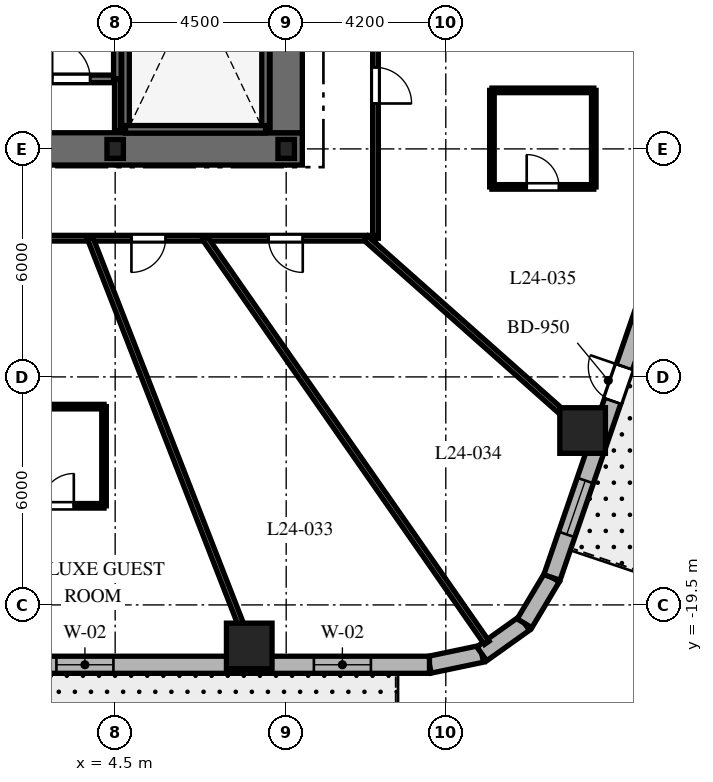
"""IFC4 building model, lengths in metres.
Left out: names, types, materials, properties, quantities, classifications, styles, units other than length and angle.
Written with IfcOpenShell. Run it as: python <this file> out.ifc"""

import sys

from ifc_helpers import new_model, si_unit, direction, frame, frame_2d, origin, origin_2d, place, context, subcontext, project, spatial, rectangle, i_section, extrude, element, fill, save


model = new_model("IFC4")
c1 = context("Model", 3, precision=1e-05, world=origin(), true_north=direction((0.0, 1.0)))
c2 = subcontext(c1, "Body", "Model", "MODEL_VIEW")
j1 = project(units=[si_unit("LENGTHUNIT", "METRE"), si_unit("PLANEANGLEUNIT", "RADIAN")], contexts=[c1])
p1 = place(None, origin())
s1 = spatial("IfcSite", under=j1, at=p1, CompositionType="ELEMENT")
p2 = place(p1, origin())
s2 = spatial("IfcBuilding", under=s1, at=p2, CompositionType="ELEMENT")
p3 = place(p2, frame((0.0, 0.0, 102.5)))
s3 = spatial("IfcBuildingStorey", under=s2, at=p3, CompositionType="ELEMENT", Elevation=102.5)
p4 = place(p3, frame((-9.425, -7.5, 0.0), z_axis=(0.0, 0.0, 1.0), x_axis=(1.0, 0.0, 0.0)))
e1 = element("IfcWall", 1, at=p4, inside=s3, PredefinedType="SHEAR", context=c2, shape_type="SweptSolid", body=[
    extrude(rectangle(XDim=18.85, YDim=0.85, at=frame_2d((9.425, 0.0))), origin(), (0.0, 0.0, 1.0), 3.7),
])
p5 = place(p4, frame((9.475, 0.0, 0.0)))
e2 = element("IfcOpeningElement", 2, at=p5, cuts=e1, PredefinedType="OPENING", context=c2, shape_type="SweptSolid", body=[
    extrude(rectangle(XDim=1.0, YDim=2.15, at=frame_2d((0.5, 1.075))), frame((0.0, 0.435, 0.0), z_axis=(0.0, -1.0, 0.0), x_axis=(1.0, 0.0, 0.0)), (0.0, 0.0, 1.0), 0.87),
])
p6 = place(p3, frame((9.0, -7.075, 0.0), z_axis=(0.0, 0.0, 1.0), x_axis=(0.0, 1.0, 0.0)))
e3 = element("IfcWall", 3, at=p6, inside=s3, PredefinedType="SHEAR", context=c2, shape_type="SweptSolid", body=[
    extrude(rectangle(XDim=14.15, YDim=0.85, at=frame_2d((7.075, 0.0))), origin(), (0.0, 0.0, 1.0), 3.7),
])
p7 = place(p6, frame((10.2, 0.0, 0.0)))
e4 = element("IfcOpeningElement", 4, at=p7, cuts=e3, PredefinedType="OPENING", context=c2, shape_type="SweptSolid", body=[
    extrude(rectangle(XDim=1.05, YDim=2.15, at=frame_2d((0.525, 1.075))), frame((0.0, 0.435, 0.0), z_axis=(0.0, -1.0, 0.0), x_axis=(1.0, 0.0, 0.0)), (0.0, 0.0, 1.0), 0.87),
])
for number, where, z_axis, x_axis in (
    (5, (4.772, -6.985, 0.0), (0.0, 0.0, 1.0), (0.0, 1.0, 0.0)),
    (6, (8.458, -6.985, 0.0), (0.0, 0.0, 1.0), (0.0, 1.0, 0.0)),
):
    element("IfcWall", number, at=place(p3, frame(where, z_axis=z_axis, x_axis=x_axis)), inside=s3, PredefinedType="SHEAR", context=c2, shape_type="SweptSolid", body=[
        extrude(rectangle(XDim=9.143, YDim=0.2, at=frame_2d((4.572, 0.0))), origin(), (0.0, 0.0, 1.0), 3.7),
    ])
p8 = place(p3, frame((4.772, -6.985, 0.0), z_axis=(0.0, 0.0, 1.0), x_axis=(1.0, 0.0, 0.0)))
e7 = element("IfcWall", 7, at=p8, inside=s3, PredefinedType="SHEAR", context=c2, shape_type="SweptSolid", body=[
    extrude(rectangle(XDim=3.686, YDim=0.2, at=frame_2d((1.843, 0.0))), origin(), (0.0, 0.0, 1.0), 3.7),
])
p9 = place(p3, frame((-4.608, -5.658, 0.0), z_axis=(0.0, 0.0, 1.0), x_axis=(1.0, 0.0, 0.0)))
e8 = element("IfcWall", 8, at=p9, inside=s3, PredefinedType="SHEAR", context=c2, shape_type="SweptSolid", body=[
    extrude(rectangle(XDim=9.166, YDim=0.2, at=frame_2d((4.583, 0.0))), origin(), (0.0, 0.0, 1.0), 3.7),
])
p10 = place(p9, frame((7.45, 0.0, 0.0)))
e9 = element("IfcOpeningElement", 9, at=p10, cuts=e8, PredefinedType="OPENING", context=c2, shape_type="SweptSolid", body=[
    extrude(rectangle(XDim=1.0, YDim=2.15, at=frame_2d((0.5, 1.075))), frame((0.0, 0.11, 0.0), z_axis=(0.0, -1.0, 0.0), x_axis=(1.0, 0.0, 0.0)), (0.0, 0.0, 1.0), 0.22),
])
p11 = place(p3, frame((4.558, -5.658, 0.0), z_axis=(0.0, 0.0, 1.0), x_axis=(0.0, 1.0, 0.0)))
e10 = element("IfcWall", 10, at=p11, inside=s3, PredefinedType="SHEAR", context=c2, shape_type="SweptSolid", body=[
    extrude(rectangle(XDim=3.686, YDim=0.2, at=frame_2d((1.843, 0.0))), origin(), (0.0, 0.0, 1.0), 3.7),
])
for number, where, z_axis, x_axis in (
    (11, (4.5, -7.5, 0.0), (0.0, 0.0, 1.0), (1.0, 0.0, 0.0)),
    (12, (9.0, -7.5, 0.0), (0.0, 0.0, 1.0), (1.0, 0.0, 0.0)),
):
    element("IfcColumn", number, at=place(p3, frame(where, z_axis=z_axis, x_axis=x_axis)), inside=s3, PredefinedType="COLUMN", context=c2, shape_type="SweptSolid", body=[
        extrude(i_section(OverallWidth=0.432, OverallDepth=0.498, WebThickness=0.056, FlangeThickness=0.089, at=origin_2d()), origin(), (0.0, 0.0, 1.0), 3.7),
    ])
for number, where, z_axis, x_axis in (
    (13, (8.028, -20.58, 0.0), (0.0, 0.0, 1.0), (1.0, 0.0, 0.0)),
    (14, (16.8, -14.911, 0.0), (0.0, 0.0, 1.0), (1.0, 0.0, 0.0)),
):
    element("IfcColumn", number, at=place(p3, frame(where, z_axis=z_axis, x_axis=x_axis)), inside=s3, PredefinedType="COLUMN", context=c2, shape_type="SweptSolid", body=[
        extrude(rectangle(XDim=1.2, YDim=1.2, at=origin_2d()), origin(), (0.0, 0.0, 1.0), 3.7),
    ])
p12 = place(p3, frame((12.771, -21.075, 0.0), z_axis=(0.0, 0.0, 1.0), x_axis=(0.97874281988, 0.205091424819, 0.0)))
e15 = element("IfcWall", 15, at=p12, inside=s3, PredefinedType="SOLIDWALL", context=c2, shape_type="SweptSolid", body=[
    extrude(rectangle(XDim=1.406, YDim=0.45, at=frame_2d((0.703, 0.0))), origin(), (0.0, 0.0, 1.0), 3.4),
])
p13 = place(p3, frame((14.146, -20.787, 0.0), z_axis=(0.0, 0.0, 1.0), x_axis=(0.814162929117, 0.580636482536, 0.0)))
e16 = element("IfcWall", 16, at=p13, inside=s3, PredefinedType="SOLIDWALL", context=c2, shape_type="SweptSolid", body=[
    extrude(rectangle(XDim=1.382, YDim=0.45, at=frame_2d((0.691, 0.0))), origin(), (0.0, 0.0, 1.0), 3.4),
])
p14 = place(p3, frame((15.272, -19.984, 0.0), z_axis=(0.0, 0.0, 1.0), x_axis=(0.512579347361, 0.858639862025, 0.0)))
e17 = element("IfcWall", 17, at=p14, inside=s3, PredefinedType="SOLIDWALL", context=c2, shape_type="SweptSolid", body=[
    extrude(rectangle(XDim=1.406, YDim=0.45, at=frame_2d((0.703, 0.0))), origin(), (0.0, 0.0, 1.0), 3.4),
])
p15 = place(p3, frame((-11.012, -21.075, 0.0), z_axis=(0.0, 0.0, 1.0), x_axis=(1.0, 0.0, 0.0)))
e18 = element("IfcWall", 18, at=p15, inside=s3, PredefinedType="SOLIDWALL", context=c2, shape_type="SweptSolid", body=[
    extrude(rectangle(XDim=23.782, YDim=0.45, at=frame_2d((11.891, 0.0))), origin(), (0.0, 0.0, 1.0), 3.4),
])
p16 = place(p15, frame((2.473, 0.0, 0.0)))
e19 = element("IfcOpeningElement", 19, at=p16, cuts=e18, PredefinedType="OPENING", context=c2, shape_type="SweptSolid", body=[
    extrude(rectangle(XDim=1.0, YDim=2.15, at=frame_2d((0.5, 1.075))), frame((0.0, 0.235, 0.0), z_axis=(0.0, -1.0, 0.0), x_axis=(1.0, 0.0, 0.0)), (0.0, 0.0, 1.0), 0.47),
])
p17 = place(p15, frame((7.398, 0.0, 0.8)))
e20 = element("IfcOpeningElement", 20, at=p17, cuts=e18, PredefinedType="OPENING", context=c2, shape_type="SweptSolid", body=[
    extrude(rectangle(XDim=1.5, YDim=1.8, at=frame_2d((0.75, 0.9))), frame((0.0, 0.235, 0.0), z_axis=(0.0, -1.0, 0.0), x_axis=(1.0, 0.0, 0.0)), (0.0, 0.0, 1.0), 0.47),
])
p18 = place(p15, frame((13.966, 0.0, 0.8)))
e21 = element("IfcOpeningElement", 21, at=p18, cuts=e18, PredefinedType="OPENING", context=c2, shape_type="SweptSolid", body=[
    extrude(rectangle(XDim=1.5, YDim=1.8, at=frame_2d((0.75, 0.9))), frame((0.0, 0.235, 0.0), z_axis=(0.0, -1.0, 0.0), x_axis=(1.0, 0.0, 0.0)), (0.0, 0.0, 1.0), 0.47),
])
p19 = place(p15, frame((20.741, 0.0, 0.8)))
e22 = element("IfcOpeningElement", 22, at=p19, cuts=e18, PredefinedType="OPENING", context=c2, shape_type="SweptSolid", body=[
    extrude(rectangle(XDim=1.5, YDim=1.8, at=frame_2d((0.75, 0.9))), frame((0.0, 0.235, 0.0), z_axis=(0.0, -1.0, 0.0), x_axis=(1.0, 0.0, 0.0)), (0.0, 0.0, 1.0), 0.47),
])
p20 = place(p3, frame((15.992, -18.777, 0.0), z_axis=(0.0, 0.0, 1.0), x_axis=(0.325606988926, 0.945505202927, 0.0)))
e23 = element("IfcWall", 23, at=p20, inside=s3, PredefinedType="SOLIDWALL", context=c2, shape_type="SweptSolid", body=[
    extrude(rectangle(XDim=19.669, YDim=0.45, at=frame_2d((9.835, 0.0))), origin(), (0.0, 0.0, 1.0), 3.4),
])
p21 = place(p20, frame((4.909, 0.0, 0.0)))
e24 = element("IfcOpeningElement", 24, at=p21, cuts=e23, PredefinedType="OPENING", context=c2, shape_type="SweptSolid", body=[
    extrude(rectangle(XDim=0.95, YDim=2.15, at=frame_2d((0.475, 1.075))), frame((0.0, 0.235, 0.0), z_axis=(0.0, -1.0, 0.0), x_axis=(1.0, 0.0, 0.0)), (0.0, 0.0, 1.0), 0.47),
])
p22 = place(p20, frame((1.197, 0.0, 0.8)))
e25 = element("IfcOpeningElement", 25, at=p22, cuts=e23, PredefinedType="OPENING", context=c2, shape_type="SweptSolid", body=[
    extrude(rectangle(XDim=1.5, YDim=1.8, at=frame_2d((0.75, 0.9))), frame((0.0, 0.235, 0.0), z_axis=(0.0, -1.0, 0.0), x_axis=(1.0, 0.0, 0.0)), (0.0, 0.0, 1.0), 0.47),
])
p23 = place(p20, frame((9.03, 0.0, 0.8)))
e26 = element("IfcOpeningElement", 26, at=p23, cuts=e23, PredefinedType="OPENING", context=c2, shape_type="SweptSolid", body=[
    extrude(rectangle(XDim=1.5, YDim=1.8, at=frame_2d((0.75, 0.9))), frame((0.0, 0.235, 0.0), z_axis=(0.0, -1.0, 0.0), x_axis=(1.0, 0.0, 0.0)), (0.0, 0.0, 1.0), 0.47),
])
p24 = place(p20, frame((16.918, 0.0, 0.8)))
e27 = element("IfcOpeningElement", 27, at=p24, cuts=e23, PredefinedType="OPENING", context=c2, shape_type="SweptSolid", body=[
    extrude(rectangle(XDim=1.5, YDim=1.8, at=frame_2d((0.75, 0.9))), frame((0.0, 0.235, 0.0), z_axis=(0.0, -1.0, 0.0), x_axis=(1.0, 0.0, 0.0)), (0.0, 0.0, 1.0), 0.47),
])
p25 = place(p3, frame((4.558, -7.02, 0.0), z_axis=(0.0, 0.0, 1.0), x_axis=(0.0, 1.0, 0.0)))
e28 = element("IfcWall", 28, at=p25, inside=s3, PredefinedType="PARTITIONING", context=c2, shape_type="SweptSolid", body=[
    extrude(rectangle(XDim=1.362, YDim=0.15, at=frame_2d((0.681, 0.0))), origin(), (0.0, 0.0, 1.0), 3.4),
])
p26 = place(p3, frame((11.35, 9.85, 0.0), z_axis=(0.0, 0.0, 1.0), x_axis=(0.0, -1.0, 0.0)))
e29 = element("IfcWall", 29, at=p26, inside=s3, PredefinedType="PARTITIONING", context=c2, shape_type="SweptSolid", body=[
    extrude(rectangle(XDim=19.7, YDim=0.15, at=frame_2d((9.85, 0.0))), origin(), (0.0, 0.0, 1.0), 2.84),
])
p27 = place(p26, frame((4.448, 0.0, 0.0)))
e30 = element("IfcOpeningElement", 30, at=p27, cuts=e29, PredefinedType="OPENING", context=c2, shape_type="SweptSolid", body=[
    extrude(rectangle(XDim=0.95, YDim=2.03, at=frame_2d((0.475, 1.015))), frame((0.0, 0.085, 0.0), z_axis=(0.0, -1.0, 0.0), x_axis=(1.0, 0.0, 0.0)), (0.0, 0.0, 1.0), 0.17),
])
p28 = place(p26, frame((1.249, 0.0, 0.0)))
e31 = element("IfcOpeningElement", 31, at=p28, cuts=e29, PredefinedType="OPENING", context=c2, shape_type="SweptSolid", body=[
    extrude(rectangle(XDim=0.9, YDim=2.03, at=frame_2d((0.45, 1.015))), frame((0.0, 0.085, 0.0), z_axis=(0.0, -1.0, 0.0), x_axis=(1.0, 0.0, 0.0)), (0.0, 0.0, 1.0), 0.17),
])
p29 = place(p26, frame((15.205, 0.0, 0.0)))
e32 = element("IfcOpeningElement", 32, at=p29, cuts=e29, PredefinedType="OPENING", context=c2, shape_type="SweptSolid", body=[
    extrude(rectangle(XDim=0.95, YDim=2.03, at=frame_2d((0.475, 1.015))), frame((0.0, 0.085, 0.0), z_axis=(0.0, -1.0, 0.0), x_axis=(1.0, 0.0, 0.0)), (0.0, 0.0, 1.0), 0.17),
])
p30 = place(p26, frame((8.836, 0.0, 0.0)))
e33 = element("IfcOpeningElement", 33, at=p30, cuts=e29, PredefinedType="OPENING", context=c2, shape_type="SweptSolid", body=[
    extrude(rectangle(XDim=0.95, YDim=2.03, at=frame_2d((0.475, 1.015))), frame((0.0, 0.085, 0.0), z_axis=(0.0, -1.0, 0.0), x_axis=(1.0, 0.0, 0.0)), (0.0, 0.0, 1.0), 0.17),
])
p31 = place(p3, frame((11.35, -9.85, 0.0), z_axis=(0.0, 0.0, 1.0), x_axis=(-1.0, 0.0, 0.0)))
e34 = element("IfcWall", 34, at=p31, inside=s3, PredefinedType="PARTITIONING", context=c2, shape_type="SweptSolid", body=[
    extrude(rectangle(XDim=22.7, YDim=0.15, at=frame_2d((11.35, 0.0))), origin(), (0.0, 0.0, 1.0), 2.84),
])
p32 = place(p31, frame((17.237, 0.0, 0.0)))
e35 = element("IfcOpeningElement", 35, at=p32, cuts=e34, PredefinedType="OPENING", context=c2, shape_type="SweptSolid", body=[
    extrude(rectangle(XDim=0.95, YDim=2.03, at=frame_2d((0.475, 1.015))), frame((0.0, 0.085, 0.0), z_axis=(0.0, -1.0, 0.0), x_axis=(1.0, 0.0, 0.0)), (0.0, 0.0, 1.0), 0.17),
])
p33 = place(p31, frame((12.39, 0.0, 0.0)))
e36 = element("IfcOpeningElement", 36, at=p33, cuts=e34, PredefinedType="OPENING", context=c2, shape_type="SweptSolid", body=[
    extrude(rectangle(XDim=0.95, YDim=2.03, at=frame_2d((0.475, 1.015))), frame((0.0, 0.085, 0.0), z_axis=(0.0, -1.0, 0.0), x_axis=(1.0, 0.0, 0.0)), (0.0, 0.0, 1.0), 0.17),
])
p34 = place(p31, frame((8.954, 0.0, 0.0)))
e37 = element("IfcOpeningElement", 37, at=p34, cuts=e34, PredefinedType="OPENING", context=c2, shape_type="SweptSolid", body=[
    extrude(rectangle(XDim=0.95, YDim=2.03, at=frame_2d((0.475, 1.015))), frame((0.0, 0.085, 0.0), z_axis=(0.0, -1.0, 0.0), x_axis=(1.0, 0.0, 0.0)), (0.0, 0.0, 1.0), 0.17),
])
p35 = place(p31, frame((5.522, 0.0, 0.0)))
e38 = element("IfcOpeningElement", 38, at=p35, cuts=e34, PredefinedType="OPENING", context=c2, shape_type="SweptSolid", body=[
    extrude(rectangle(XDim=0.9, YDim=2.03, at=frame_2d((0.45, 1.015))), frame((0.0, 0.085, 0.0), z_axis=(0.0, -1.0, 0.0), x_axis=(1.0, 0.0, 0.0)), (0.0, 0.0, 1.0), 0.17),
])
p36 = place(p31, frame((1.914, 0.0, 0.0)))
e39 = element("IfcOpeningElement", 39, at=p36, cuts=e34, PredefinedType="OPENING", context=c2, shape_type="SweptSolid", body=[
    extrude(rectangle(XDim=0.9, YDim=2.03, at=frame_2d((0.45, 1.015))), frame((0.0, 0.085, 0.0), z_axis=(0.0, -1.0, 0.0), x_axis=(1.0, 0.0, 0.0)), (0.0, 0.0, 1.0), 0.17),
])
p37 = place(p3, frame((3.842, -9.85, 0.0), z_axis=(0.0, 0.0, 1.0), x_axis=(0.363432685593, -0.931620460833, 0.0)))
e40 = element("IfcWall", 40, at=p37, inside=s3, PredefinedType="PARTITIONING", context=c2, shape_type="SweptSolid", body=[
    extrude(rectangle(XDim=12.049, YDim=0.15, at=frame_2d((6.024, 0.0))), origin(), (0.0, 0.0, 1.0), 2.54),
])
p38 = place(p3, frame((6.861, -9.85, 0.0), z_axis=(0.0, 0.0, 1.0), x_axis=(0.571575431292, -0.820549527051, 0.0)))
e41 = element("IfcWall", 41, at=p38, inside=s3, PredefinedType="PARTITIONING", context=c2, shape_type="SweptSolid", body=[
    extrude(rectangle(XDim=12.975, YDim=0.15, at=frame_2d((6.488, 0.0))), origin(), (0.0, 0.0, 1.0), 2.54),
])
p39 = place(p3, frame((11.098, -9.85, 0.0), z_axis=(0.0, 0.0, 1.0), x_axis=(0.747904295103, -0.663806572253, 0.0)))
e42 = element("IfcWall", 42, at=p39, inside=s3, PredefinedType="PARTITIONING", context=c2, shape_type="SweptSolid", body=[
    extrude(rectangle(XDim=8.16, YDim=0.15, at=frame_2d((4.08, 0.0))), origin(), (0.0, 0.0, 1.0), 2.54),
])
p40 = place(p3, frame((1.767, -16.892, 0.0), z_axis=(0.0, 0.0, 1.0), x_axis=(1.0, 0.0, 0.0)))
e43 = element("IfcWall", 43, at=p40, inside=s3, PredefinedType="PARTITIONING", context=c2, shape_type="SweptSolid", body=[
    extrude(rectangle(XDim=2.44, YDim=0.12, at=frame_2d((1.22, 0.0))), origin(), (0.0, 0.0, 1.0), 3.4),
])
p41 = place(p40, frame((0.795, 0.0, 0.0)))
e44 = element("IfcOpeningElement", 44, at=p41, cuts=e43, PredefinedType="OPENING", context=c2, shape_type="SweptSolid", body=[
    extrude(rectangle(XDim=0.85, YDim=2.03, at=frame_2d((0.425, 1.015))), frame((0.0, 0.07, 0.0), z_axis=(0.0, -1.0, 0.0), x_axis=(1.0, 0.0, 0.0)), (0.0, 0.0, 1.0), 0.14),
])
p42 = place(p3, frame((4.207, -16.892, 0.0), z_axis=(0.0, 0.0, 1.0), x_axis=(0.0, 1.0, 0.0)))
e45 = element("IfcWall", 45, at=p42, inside=s3, PredefinedType="PARTITIONING", context=c2, shape_type="SweptSolid", body=[
    extrude(rectangle(XDim=2.61, YDim=0.12, at=frame_2d((1.305, 0.0))), origin(), (0.0, 0.0, 1.0), 2.84),
])
p43 = place(p3, frame((4.207, -14.282, 0.0), z_axis=(0.0, 0.0, 1.0), x_axis=(-1.0, 0.0, 0.0)))
e46 = element("IfcWall", 46, at=p43, inside=s3, PredefinedType="PARTITIONING", context=c2, shape_type="SweptSolid", body=[
    extrude(rectangle(XDim=2.44, YDim=0.12, at=frame_2d((1.22, 0.0))), origin(), (0.0, 0.0, 1.0), 3.4),
])
p44 = place(p3, frame((14.414, -8.5, 0.0), z_axis=(0.0, 0.0, 1.0), x_axis=(1.0, 0.0, 0.0)))
e47 = element("IfcWall", 47, at=p44, inside=s3, PredefinedType="PARTITIONING", context=c2, shape_type="SweptSolid", body=[
    extrude(rectangle(XDim=2.68, YDim=0.12, at=frame_2d((1.34, 0.0))), origin(), (0.0, 0.0, 1.0), 2.972),
])
p45 = place(p44, frame((0.915, 0.0, 0.0)))
e48 = element("IfcOpeningElement", 48, at=p45, cuts=e47, PredefinedType="OPENING", context=c2, shape_type="SweptSolid", body=[
    extrude(rectangle(XDim=0.85, YDim=2.03, at=frame_2d((0.425, 1.015))), frame((0.0, 0.07, 0.0), z_axis=(0.0, -1.0, 0.0), x_axis=(1.0, 0.0, 0.0)), (0.0, 0.0, 1.0), 0.14),
])
p46 = place(p3, frame((17.094, -8.5, 0.0), z_axis=(0.0, 0.0, 1.0), x_axis=(0.0, 1.0, 0.0)))
e49 = element("IfcWall", 49, at=p46, inside=s3, PredefinedType="PARTITIONING", context=c2, shape_type="SweptSolid", body=[
    extrude(rectangle(XDim=2.54, YDim=0.12, at=frame_2d((1.27, 0.0))), origin(), (0.0, 0.0, 1.0), 3.4),
])
p47 = place(p3, frame((17.094, -5.96, 0.0), z_axis=(0.0, 0.0, 1.0), x_axis=(-1.0, 0.0, 0.0)))
e50 = element("IfcWall", 50, at=p47, inside=s3, PredefinedType="PARTITIONING", context=c2, shape_type="SweptSolid", body=[
    extrude(rectangle(XDim=2.68, YDim=0.12, at=frame_2d((1.34, 0.0))), origin(), (0.0, 0.0, 1.0), 2.972),
])
p48 = place(p3, frame((14.414, -5.96, 0.0), z_axis=(0.0, 0.0, 1.0), x_axis=(0.0, -1.0, 0.0)))
e51 = element("IfcWall", 51, at=p48, inside=s3, PredefinedType="PARTITIONING", context=c2, shape_type="SweptSolid", body=[
    extrude(rectangle(XDim=2.54, YDim=0.12, at=frame_2d((1.27, 0.0))), origin(), (0.0, 0.0, 1.0), 3.4),
])
p49 = place(p18, origin())
e52 = element("IfcWindow", 52, at=p49, inside=s3, PartitioningType="SINGLE_PANEL", PredefinedType="WINDOW", context=c2, shape_type="SweptSolid", body=[
    extrude(rectangle(XDim=1.5, YDim=1.8, at=frame_2d((0.75, 0.9))), frame((0.0, 0.03, 0.0), z_axis=(0.0, -1.0, 0.0), x_axis=(1.0, 0.0, 0.0)), (0.0, 0.0, 1.0), 0.06),
])
fill(e21, e52)
p50 = place(p19, origin())
e53 = element("IfcWindow", 53, at=p50, inside=s3, PartitioningType="SINGLE_PANEL", PredefinedType="WINDOW", context=c2, shape_type="SweptSolid", body=[
    extrude(rectangle(XDim=1.5, YDim=1.8, at=frame_2d((0.75, 0.9))), frame((0.0, 0.03, 0.0), z_axis=(0.0, -1.0, 0.0), x_axis=(1.0, 0.0, 0.0)), (0.0, 0.0, 1.0), 0.06),
])
fill(e22, e53)
p51 = place(p21, origin())
e54 = element("IfcDoor", 54, at=p51, inside=s3, OperationType="SINGLE_SWING_RIGHT", PredefinedType="DOOR", context=c2, shape_type="SweptSolid", body=[
    extrude(rectangle(XDim=0.95, YDim=2.15, at=frame_2d((0.475, 1.075))), frame((0.0, 0.025, 0.0), z_axis=(0.0, -1.0, 0.0), x_axis=(1.0, 0.0, 0.0)), (0.0, 0.0, 1.0), 0.05),
])
fill(e24, e54)
p52 = place(p22, origin())
e55 = element("IfcWindow", 55, at=p52, inside=s3, PartitioningType="SINGLE_PANEL", PredefinedType="WINDOW", context=c2, shape_type="SweptSolid", body=[
    extrude(rectangle(XDim=1.5, YDim=1.8, at=frame_2d((0.75, 0.9))), frame((0.0, 0.03, 0.0), z_axis=(0.0, -1.0, 0.0), x_axis=(1.0, 0.0, 0.0)), (0.0, 0.0, 1.0), 0.06),
])
fill(e25, e55)
p53 = place(p10, origin())
e56 = element("IfcDoor", 56, at=p53, inside=s3, OperationType="SINGLE_SWING_LEFT", PredefinedType="DOOR", context=c2, shape_type="SweptSolid", body=[
    extrude(rectangle(XDim=1.0, YDim=2.15, at=frame_2d((0.5, 1.075))), frame((0.0, 0.025, 0.0), z_axis=(0.0, -1.0, 0.0), x_axis=(1.0, 0.0, 0.0)), (0.0, 0.0, 1.0), 0.05),
])
fill(e9, e56)
p54 = place(p41, origin())
e57 = element("IfcDoor", 57, at=p54, inside=s3, OperationType="SINGLE_SWING_RIGHT", PredefinedType="DOOR", context=c2, shape_type="SweptSolid", body=[
    extrude(rectangle(XDim=0.85, YDim=2.03, at=frame_2d((0.425, 1.015))), frame((0.0, 0.025, 0.0), z_axis=(0.0, -1.0, 0.0), x_axis=(1.0, 0.0, 0.0)), (0.0, 0.0, 1.0), 0.05),
])
fill(e44, e57)
p55 = place(p35, origin())
e58 = element("IfcDoor", 58, at=p55, inside=s3, OperationType="SINGLE_SWING_RIGHT", PredefinedType="DOOR", context=c2, shape_type="SweptSolid", body=[
    extrude(rectangle(XDim=0.9, YDim=2.03, at=frame_2d((0.45, 1.015))), frame((0.0, 0.025, 0.0), z_axis=(0.0, -1.0, 0.0), x_axis=(1.0, 0.0, 0.0)), (0.0, 0.0, 1.0), 0.05),
])
fill(e38, e58)
p56 = place(p36, origin())
e59 = element("IfcDoor", 59, at=p56, inside=s3, OperationType="SINGLE_SWING_LEFT", PredefinedType="DOOR", context=c2, shape_type="SweptSolid", body=[
    extrude(rectangle(XDim=0.9, YDim=2.03, at=frame_2d((0.45, 1.015))), frame((0.0, 0.025, 0.0), z_axis=(0.0, -1.0, 0.0), x_axis=(1.0, 0.0, 0.0)), (0.0, 0.0, 1.0), 0.05),
])
fill(e39, e59)
p57 = place(p29, origin())
e60 = element("IfcDoor", 60, at=p57, inside=s3, OperationType="SINGLE_SWING_RIGHT", PredefinedType="DOOR", context=c2, shape_type="SweptSolid", body=[
    extrude(rectangle(XDim=0.95, YDim=2.03, at=frame_2d((0.475, 1.015))), frame((0.0, 0.025, 0.0), z_axis=(0.0, -1.0, 0.0), x_axis=(1.0, 0.0, 0.0)), (0.0, 0.0, 1.0), 0.05),
])
fill(e32, e60)
p58 = place(p45, origin())
e61 = element("IfcDoor", 61, at=p58, inside=s3, OperationType="SINGLE_SWING_LEFT", PredefinedType="DOOR", context=c2, shape_type="SweptSolid", body=[
    extrude(rectangle(XDim=0.85, YDim=2.03, at=frame_2d((0.425, 1.015))), frame((0.0, 0.025, 0.0), z_axis=(0.0, -1.0, 0.0), x_axis=(1.0, 0.0, 0.0)), (0.0, 0.0, 1.0), 0.05),
])
fill(e48, e61)
save(model, sys.argv[1])
